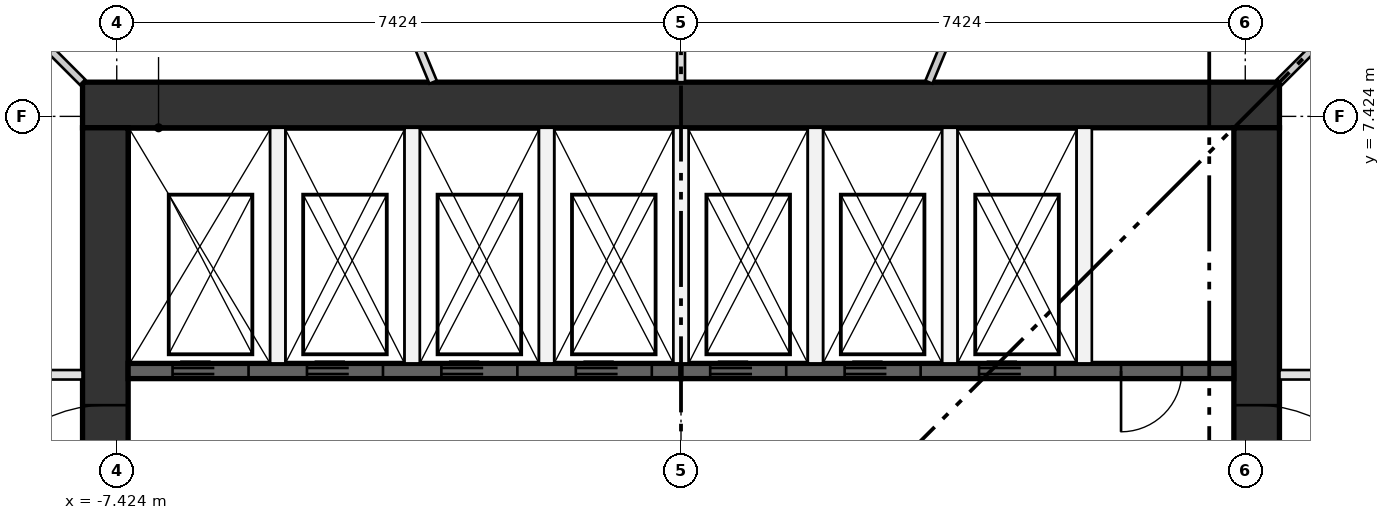
"""IFC4 building model, lengths in metres.
Left out: names, types, materials, properties, quantities, classifications, styles, units other than length and angle.
Written with IfcOpenShell. Run it as: python <this file> out.ifc"""

import sys

from ifc_helpers import new_model, si_unit, direction, frame, frame_2d, origin, place, context, subcontext, project, spatial, rectangle, extrude, element, fill, save


model = new_model("IFC4")
c1 = context("Model", 3, precision=1e-05, world=origin(), true_north=direction((0.0, 1.0)))
c2 = subcontext(c1, "Body", "Model", "MODEL_VIEW")
j1 = project(units=[si_unit("LENGTHUNIT", "METRE"), si_unit("PLANEANGLEUNIT", "RADIAN")], contexts=[c1])
p1 = place(None, origin())
s1 = spatial("IfcSite", under=j1, at=p1, CompositionType="ELEMENT")
p2 = place(p1, origin())
s2 = spatial("IfcBuilding", under=s1, at=p2, CompositionType="ELEMENT")
p3 = place(p2, frame((0.0, 0.0, 151.1)))
s3 = spatial("IfcBuildingStorey", under=s2, at=p3, CompositionType="ELEMENT", Elevation=151.1)
p4 = place(p3, frame((-7.874, 7.574, 0.0), z_axis=(0.0, 0.0, 1.0), x_axis=(1.0, 0.0, 0.0)))
e1 = element("IfcWall", 1, at=p4, inside=s3, PredefinedType="SHEAR", context=c2, shape_type="SweptSolid", body=[
    extrude(rectangle(XDim=15.748, YDim=0.6, at=frame_2d((7.874, 0.0))), origin(), (0.0, 0.0, 1.0), 3.35),
])
p5 = place(p3, frame((-7.574, -7.274, 0.0), z_axis=(0.0, 0.0, 1.0), x_axis=(0.0, 1.0, 0.0)))
e2 = element("IfcWall", 2, at=p5, inside=s3, PredefinedType="SHEAR", context=c2, shape_type="SweptSolid", body=[
    extrude(rectangle(XDim=14.548, YDim=0.6, at=frame_2d((7.274, 0.0))), origin(), (0.0, 0.0, 1.0), 3.35),
])
p6 = place(p5, frame((6.774, 0.0, 0.0)))
e3 = element("IfcOpeningElement", 3, at=p6, cuts=e2, PredefinedType="OPENING", context=c2, shape_type="SweptSolid", body=[
    extrude(rectangle(XDim=1.0, YDim=2.1, at=frame_2d((0.5, 1.05))), frame((0.0, 0.31, 0.0), z_axis=(0.0, -1.0, 0.0), x_axis=(1.0, 0.0, 0.0)), (0.0, 0.0, 1.0), 0.62),
])
p7 = place(p5, frame((3.649, 0.0, 0.0)))
e4 = element("IfcOpeningElement", 4, at=p7, cuts=e2, PredefinedType="OPENING", context=c2, shape_type="SweptSolid", body=[
    extrude(rectangle(XDim=1.8, YDim=2.1, at=frame_2d((0.9, 1.05))), frame((0.0, 0.31, 0.0), z_axis=(0.0, -1.0, 0.0), x_axis=(1.0, 0.0, 0.0)), (0.0, 0.0, 1.0), 0.62),
])
p8 = place(p5, frame((9.098, 0.0, 0.0)))
e5 = element("IfcOpeningElement", 5, at=p8, cuts=e2, PredefinedType="OPENING", context=c2, shape_type="SweptSolid", body=[
    extrude(rectangle(XDim=1.8, YDim=2.1, at=frame_2d((0.9, 1.05))), frame((0.0, 0.31, 0.0), z_axis=(0.0, -1.0, 0.0), x_axis=(1.0, 0.0, 0.0)), (0.0, 0.0, 1.0), 0.62),
])
p9 = place(p3, frame((7.574, -7.274, 0.0), z_axis=(0.0, 0.0, 1.0), x_axis=(0.0, 1.0, 0.0)))
e6 = element("IfcWall", 6, at=p9, inside=s3, PredefinedType="SHEAR", context=c2, shape_type="SweptSolid", body=[
    extrude(rectangle(XDim=14.548, YDim=0.6, at=frame_2d((7.274, 0.0))), origin(), (0.0, 0.0, 1.0), 3.35),
])
p10 = place(p9, frame((6.774, 0.0, 0.0)))
e7 = element("IfcOpeningElement", 7, at=p10, cuts=e6, PredefinedType="OPENING", context=c2, shape_type="SweptSolid", body=[
    extrude(rectangle(XDim=1.0, YDim=2.1, at=frame_2d((0.5, 1.05))), frame((0.0, 0.31, 0.0), z_axis=(0.0, -1.0, 0.0), x_axis=(1.0, 0.0, 0.0)), (0.0, 0.0, 1.0), 0.62),
])
p11 = place(p9, frame((3.649, 0.0, 0.0)))
e8 = element("IfcOpeningElement", 8, at=p11, cuts=e6, PredefinedType="OPENING", context=c2, shape_type="SweptSolid", body=[
    extrude(rectangle(XDim=1.8, YDim=2.1, at=frame_2d((0.9, 1.05))), frame((0.0, 0.31, 0.0), z_axis=(0.0, -1.0, 0.0), x_axis=(1.0, 0.0, 0.0)), (0.0, 0.0, 1.0), 0.62),
])
p12 = place(p9, frame((9.098, 0.0, 0.0)))
e9 = element("IfcOpeningElement", 9, at=p12, cuts=e6, PredefinedType="OPENING", context=c2, shape_type="SweptSolid", body=[
    extrude(rectangle(XDim=1.8, YDim=2.1, at=frame_2d((0.9, 1.05))), frame((0.0, 0.31, 0.0), z_axis=(0.0, -1.0, 0.0), x_axis=(1.0, 0.0, 0.0)), (0.0, 0.0, 1.0), 0.62),
])
p13 = place(p3, frame((-7.274, 4.074, 0.0), z_axis=(0.0, 0.0, 1.0), x_axis=(1.0, 0.0, 0.0)))
e10 = element("IfcWall", 10, at=p13, inside=s3, PredefinedType="SHEAR", context=c2, shape_type="SweptSolid", body=[
    extrude(rectangle(XDim=7.274, YDim=0.2, at=frame_2d((3.637, 0.0))), origin(), (0.0, 0.0, 1.0), 3.0),
])
p14 = place(p13, frame((0.584, 0.0, 0.0)))
e11 = element("IfcOpeningElement", 11, at=p14, cuts=e10, PredefinedType="OPENING", context=c2, shape_type="SweptSolid", body=[
    extrude(rectangle(XDim=1.0, YDim=2.1, at=frame_2d((0.5, 1.05))), frame((0.0, 0.11, 0.0), z_axis=(0.0, -1.0, 0.0), x_axis=(1.0, 0.0, 0.0)), (0.0, 0.0, 1.0), 0.22),
])
p15 = place(p13, frame((2.353, 0.0, 0.0)))
e12 = element("IfcOpeningElement", 12, at=p15, cuts=e10, PredefinedType="OPENING", context=c2, shape_type="SweptSolid", body=[
    extrude(rectangle(XDim=1.0, YDim=2.1, at=frame_2d((0.5, 1.05))), frame((0.0, 0.11, 0.0), z_axis=(0.0, -1.0, 0.0), x_axis=(1.0, 0.0, 0.0)), (0.0, 0.0, 1.0), 0.22),
])
p16 = place(p13, frame((4.121, 0.0, 0.0)))
e13 = element("IfcOpeningElement", 13, at=p16, cuts=e10, PredefinedType="OPENING", context=c2, shape_type="SweptSolid", body=[
    extrude(rectangle(XDim=1.0, YDim=2.1, at=frame_2d((0.5, 1.05))), frame((0.0, 0.11, 0.0), z_axis=(0.0, -1.0, 0.0), x_axis=(1.0, 0.0, 0.0)), (0.0, 0.0, 1.0), 0.22),
])
p17 = place(p13, frame((5.89, 0.0, 0.0)))
e14 = element("IfcOpeningElement", 14, at=p17, cuts=e10, PredefinedType="OPENING", context=c2, shape_type="SweptSolid", body=[
    extrude(rectangle(XDim=1.0, YDim=2.1, at=frame_2d((0.5, 1.05))), frame((0.0, 0.11, 0.0), z_axis=(0.0, -1.0, 0.0), x_axis=(1.0, 0.0, 0.0)), (0.0, 0.0, 1.0), 0.22),
])
p18 = place(p3, frame((0.0, 4.074, 0.0), z_axis=(0.0, 0.0, 1.0), x_axis=(1.0, 0.0, 0.0)))
e15 = element("IfcWall", 15, at=p18, inside=s3, PredefinedType="SHEAR", context=c2, shape_type="SweptSolid", body=[
    extrude(rectangle(XDim=7.274, YDim=0.2, at=frame_2d((3.637, 0.0))), origin(), (0.0, 0.0, 1.0), 3.0),
])
p19 = place(p18, frame((0.384, 0.0, 0.0)))
e16 = element("IfcOpeningElement", 16, at=p19, cuts=e15, PredefinedType="OPENING", context=c2, shape_type="SweptSolid", body=[
    extrude(rectangle(XDim=1.0, YDim=2.1, at=frame_2d((0.5, 1.05))), frame((0.0, 0.11, 0.0), z_axis=(0.0, -1.0, 0.0), x_axis=(1.0, 0.0, 0.0)), (0.0, 0.0, 1.0), 0.22),
])
p20 = place(p18, frame((2.153, 0.0, 0.0)))
e17 = element("IfcOpeningElement", 17, at=p20, cuts=e15, PredefinedType="OPENING", context=c2, shape_type="SweptSolid", body=[
    extrude(rectangle(XDim=1.0, YDim=2.1, at=frame_2d((0.5, 1.05))), frame((0.0, 0.11, 0.0), z_axis=(0.0, -1.0, 0.0), x_axis=(1.0, 0.0, 0.0)), (0.0, 0.0, 1.0), 0.22),
])
p21 = place(p18, frame((3.921, 0.0, 0.0)))
e18 = element("IfcOpeningElement", 18, at=p21, cuts=e15, PredefinedType="OPENING", context=c2, shape_type="SweptSolid", body=[
    extrude(rectangle(XDim=1.0, YDim=2.1, at=frame_2d((0.5, 1.05))), frame((0.0, 0.11, 0.0), z_axis=(0.0, -1.0, 0.0), x_axis=(1.0, 0.0, 0.0)), (0.0, 0.0, 1.0), 0.22),
])
p22 = place(p18, frame((5.79, 0.0, 0.0)))
e19 = element("IfcOpeningElement", 19, at=p22, cuts=e15, PredefinedType="OPENING", context=c2, shape_type="SweptSolid", body=[
    extrude(rectangle(XDim=0.8, YDim=2.1, at=frame_2d((0.4, 1.05))), frame((0.0, 0.11, 0.0), z_axis=(0.0, -1.0, 0.0), x_axis=(1.0, 0.0, 0.0)), (0.0, 0.0, 1.0), 0.22),
])
for number, where, z_axis, x_axis in (
    (20, (-5.305, 4.174, 0.0), (0.0, 0.0, 1.0), (0.0, 1.0, 0.0)),
    (21, (-3.537, 4.174, 0.0), (0.0, 0.0, 1.0), (0.0, 1.0, 0.0)),
    (22, (-1.769, 4.174, 0.0), (0.0, 0.0, 1.0), (0.0, 1.0, 0.0)),
    (23, (0.0, 4.174, 0.0), (0.0, 0.0, 1.0), (0.0, 1.0, 0.0)),
    (24, (1.769, 4.174, 0.0), (0.0, 0.0, 1.0), (0.0, 1.0, 0.0)),
    (25, (3.537, 4.174, 0.0), (0.0, 0.0, 1.0), (0.0, 1.0, 0.0)),
    (26, (5.305, 4.174, 0.0), (0.0, 0.0, 1.0), (0.0, 1.0, 0.0)),
):
    element("IfcWall", number, at=place(p3, frame(where, z_axis=z_axis, x_axis=x_axis)), inside=s3, PredefinedType="PARTITIONING", context=c2, shape_type="SweptSolid", body=[
        extrude(rectangle(XDim=3.1, YDim=0.2, at=frame_2d((1.55, 0.0))), origin(), (0.0, 0.0, 1.0), 3.0),
    ])
p23 = place(p3, frame((7.874, 4.024, 0.0), z_axis=(0.0, 0.0, 1.0), x_axis=(1.0, 0.0, 0.0)))
e27 = element("IfcWall", 27, at=p23, inside=s3, PredefinedType="PARTITIONING", context=c2, shape_type="SweptSolid", body=[
    extrude(rectangle(XDim=5.036, YDim=0.125, at=frame_2d((2.518, 0.0))), origin(), (0.0, 0.0, 1.0), 3.0),
])
p24 = place(p23, frame((2.0, 0.0, 0.0)))
e28 = element("IfcOpeningElement", 28, at=p24, cuts=e27, PredefinedType="OPENING", context=c2, shape_type="SweptSolid", body=[
    extrude(rectangle(XDim=1.0, YDim=2.1, at=frame_2d((0.5, 1.05))), frame((0.0, 0.073, 0.0), z_axis=(0.0, -1.0, 0.0), x_axis=(1.0, 0.0, 0.0)), (0.0, 0.0, 1.0), 0.145),
])
p25 = place(p3, frame((-11.645, 4.024, 0.0), z_axis=(0.0, 0.0, 1.0), x_axis=(1.0, 0.0, 0.0)))
e29 = element("IfcWall", 29, at=p25, inside=s3, PredefinedType="PARTITIONING", context=c2, shape_type="SweptSolid", body=[
    extrude(rectangle(XDim=3.771, YDim=0.125, at=frame_2d((1.886, 0.0))), origin(), (0.0, 0.0, 1.0), 3.0),
])
p26 = place(p25, frame((1.4, 0.0, 0.0)))
e30 = element("IfcOpeningElement", 30, at=p26, cuts=e29, PredefinedType="OPENING", context=c2, shape_type="SweptSolid", body=[
    extrude(rectangle(XDim=1.0, YDim=2.1, at=frame_2d((0.5, 1.05))), frame((0.0, 0.073, 0.0), z_axis=(0.0, -1.0, 0.0), x_axis=(1.0, 0.0, 0.0)), (0.0, 0.0, 1.0), 0.145),
])
p27 = place(p3, frame((7.874, 7.874, 0.0), z_axis=(0.0, 0.0, 1.0), x_axis=(0.707106781187, 0.707106781187, 0.0)))
e31 = element("IfcWall", 31, at=p27, inside=s3, PredefinedType="PARTITIONING", context=c2, shape_type="SweptSolid", body=[
    extrude(rectangle(XDim=6.564, YDim=0.1, at=frame_2d((3.282, 0.0))), origin(), (0.0, 0.0, 1.0), 3.0),
])
p28 = place(p27, frame((2.5, 0.0, 0.0)))
e32 = element("IfcOpeningElement", 32, at=p28, cuts=e31, PredefinedType="OPENING", context=c2, shape_type="SweptSolid", body=[
    extrude(rectangle(XDim=1.0, YDim=2.1, at=frame_2d((0.5, 1.05))), frame((0.0, 0.06, 0.0), z_axis=(0.0, -1.0, 0.0), x_axis=(1.0, 0.0, 0.0)), (0.0, 0.0, 1.0), 0.12),
])
p29 = place(p3, frame((3.261, 7.874, 0.0), z_axis=(0.0, 0.0, 1.0), x_axis=(0.382691869474, 0.923876037701, 0.0)))
e33 = element("IfcWall", 33, at=p29, inside=s3, PredefinedType="PARTITIONING", context=c2, shape_type="SweptSolid", body=[
    extrude(rectangle(XDim=4.607, YDim=0.1, at=frame_2d((2.304, 0.0))), origin(), (0.0, 0.0, 1.0), 3.0),
])
p30 = place(p29, frame((1.8, 0.0, 0.0)))
e34 = element("IfcOpeningElement", 34, at=p30, cuts=e33, PredefinedType="OPENING", context=c2, shape_type="SweptSolid", body=[
    extrude(rectangle(XDim=1.0, YDim=2.1, at=frame_2d((0.5, 1.05))), frame((0.0, 0.06, 0.0), z_axis=(0.0, -1.0, 0.0), x_axis=(1.0, 0.0, 0.0)), (0.0, 0.0, 1.0), 0.12),
])
p31 = place(p3, frame((0.0, 7.874, 0.0), z_axis=(0.0, 0.0, 1.0), x_axis=(0.0, 1.0, 0.0)))
e35 = element("IfcWall", 35, at=p31, inside=s3, PredefinedType="PARTITIONING", context=c2, shape_type="SweptSolid", body=[
    extrude(rectangle(XDim=5.256, YDim=0.105, at=frame_2d((2.628, 0.0))), origin(), (0.0, 0.0, 1.0), 3.0),
])
p32 = place(p31, frame((2.1, 0.0, 0.0)))
e36 = element("IfcOpeningElement", 36, at=p32, cuts=e35, PredefinedType="OPENING", context=c2, shape_type="SweptSolid", body=[
    extrude(rectangle(XDim=1.0, YDim=2.1, at=frame_2d((0.5, 1.05))), frame((0.0, 0.062, 0.0), z_axis=(0.0, -1.0, 0.0), x_axis=(1.0, 0.0, 0.0)), (0.0, 0.0, 1.0), 0.125),
])
p33 = place(p3, frame((-3.261, 7.874, 0.0), z_axis=(0.0, 0.0, 1.0), x_axis=(-0.382691869474, 0.923876037701, 0.0)))
e37 = element("IfcWall", 37, at=p33, inside=s3, PredefinedType="PARTITIONING", context=c2, shape_type="SweptSolid", body=[
    extrude(rectangle(XDim=4.607, YDim=0.105, at=frame_2d((2.304, 0.0))), origin(), (0.0, 0.0, 1.0), 3.0),
])
p34 = place(p3, frame((-12.516, 12.516, 0.0), z_axis=(0.0, 0.0, 1.0), x_axis=(0.707106781187, -0.707106781187, 0.0)))
e38 = element("IfcWall", 38, at=p34, inside=s3, PredefinedType="PARTITIONING", context=c2, shape_type="SweptSolid", body=[
    extrude(rectangle(XDim=6.564, YDim=0.1, at=frame_2d((3.282, 0.0))), origin(), (0.0, 0.0, 1.0), 3.0),
])
p35 = place(p34, frame((3.0, 0.0, 0.0)))
e39 = element("IfcOpeningElement", 39, at=p35, cuts=e38, PredefinedType="OPENING", context=c2, shape_type="SweptSolid", body=[
    extrude(rectangle(XDim=1.0, YDim=2.1, at=frame_2d((0.5, 1.05))), frame((0.0, 0.06, 0.0), z_axis=(0.0, -1.0, 0.0), x_axis=(1.0, 0.0, 0.0)), (0.0, 0.0, 1.0), 0.12),
])
p36 = place(p14, frame((1.0, 0.0, 0.0), z_axis=(0.0, 0.0, 1.0), x_axis=(-1.0, 0.0, 0.0)))
e40 = element("IfcDoor", 40, at=p36, inside=s3, OperationType="DOUBLE_DOOR_SLIDING", PredefinedType="DOOR", context=c2, shape_type="SweptSolid", body=[
    extrude(rectangle(XDim=1.0, YDim=2.1, at=frame_2d((0.5, 1.05))), frame((0.0, 0.025, 0.0), z_axis=(0.0, -1.0, 0.0), x_axis=(1.0, 0.0, 0.0)), (0.0, 0.0, 1.0), 0.05),
])
fill(e11, e40)
p37 = place(p15, frame((1.0, 0.0, 0.0), z_axis=(0.0, 0.0, 1.0), x_axis=(-1.0, 0.0, 0.0)))
e41 = element("IfcDoor", 41, at=p37, inside=s3, OperationType="DOUBLE_DOOR_SLIDING", PredefinedType="DOOR", context=c2, shape_type="SweptSolid", body=[
    extrude(rectangle(XDim=1.0, YDim=2.1, at=frame_2d((0.5, 1.05))), frame((0.0, 0.025, 0.0), z_axis=(0.0, -1.0, 0.0), x_axis=(1.0, 0.0, 0.0)), (0.0, 0.0, 1.0), 0.05),
])
fill(e12, e41)
p38 = place(p16, frame((1.0, 0.0, 0.0), z_axis=(0.0, 0.0, 1.0), x_axis=(-1.0, 0.0, 0.0)))
e42 = element("IfcDoor", 42, at=p38, inside=s3, OperationType="DOUBLE_DOOR_SLIDING", PredefinedType="DOOR", context=c2, shape_type="SweptSolid", body=[
    extrude(rectangle(XDim=1.0, YDim=2.1, at=frame_2d((0.5, 1.05))), frame((0.0, 0.025, 0.0), z_axis=(0.0, -1.0, 0.0), x_axis=(1.0, 0.0, 0.0)), (0.0, 0.0, 1.0), 0.05),
])
fill(e13, e42)
p39 = place(p17, frame((1.0, 0.0, 0.0), z_axis=(0.0, 0.0, 1.0), x_axis=(-1.0, 0.0, 0.0)))
e43 = element("IfcDoor", 43, at=p39, inside=s3, OperationType="DOUBLE_DOOR_SLIDING", PredefinedType="DOOR", context=c2, shape_type="SweptSolid", body=[
    extrude(rectangle(XDim=1.0, YDim=2.1, at=frame_2d((0.5, 1.05))), frame((0.0, 0.025, 0.0), z_axis=(0.0, -1.0, 0.0), x_axis=(1.0, 0.0, 0.0)), (0.0, 0.0, 1.0), 0.05),
])
fill(e14, e43)
p40 = place(p19, frame((1.0, 0.0, 0.0), z_axis=(0.0, 0.0, 1.0), x_axis=(-1.0, 0.0, 0.0)))
e44 = element("IfcDoor", 44, at=p40, inside=s3, OperationType="DOUBLE_DOOR_SLIDING", PredefinedType="DOOR", context=c2, shape_type="SweptSolid", body=[
    extrude(rectangle(XDim=1.0, YDim=2.1, at=frame_2d((0.5, 1.05))), frame((0.0, 0.025, 0.0), z_axis=(0.0, -1.0, 0.0), x_axis=(1.0, 0.0, 0.0)), (0.0, 0.0, 1.0), 0.05),
])
fill(e16, e44)
p41 = place(p20, frame((1.0, 0.0, 0.0), z_axis=(0.0, 0.0, 1.0), x_axis=(-1.0, 0.0, 0.0)))
e45 = element("IfcDoor", 45, at=p41, inside=s3, OperationType="DOUBLE_DOOR_SLIDING", PredefinedType="DOOR", context=c2, shape_type="SweptSolid", body=[
    extrude(rectangle(XDim=1.0, YDim=2.1, at=frame_2d((0.5, 1.05))), frame((0.0, 0.025, 0.0), z_axis=(0.0, -1.0, 0.0), x_axis=(1.0, 0.0, 0.0)), (0.0, 0.0, 1.0), 0.05),
])
fill(e17, e45)
p42 = place(p21, frame((1.0, 0.0, 0.0), z_axis=(0.0, 0.0, 1.0), x_axis=(-1.0, 0.0, 0.0)))
e46 = element("IfcDoor", 46, at=p42, inside=s3, OperationType="DOUBLE_DOOR_SLIDING", PredefinedType="DOOR", context=c2, shape_type="SweptSolid", body=[
    extrude(rectangle(XDim=1.0, YDim=2.1, at=frame_2d((0.5, 1.05))), frame((0.0, 0.025, 0.0), z_axis=(0.0, -1.0, 0.0), x_axis=(1.0, 0.0, 0.0)), (0.0, 0.0, 1.0), 0.05),
])
fill(e18, e46)
p43 = place(p22, frame((0.8, 0.0, 0.0), z_axis=(0.0, 0.0, 1.0), x_axis=(-1.0, 0.0, 0.0)))
e47 = element("IfcDoor", 47, at=p43, inside=s3, OperationType="SINGLE_SWING_LEFT", PredefinedType="DOOR", context=c2, shape_type="SweptSolid", body=[
    extrude(rectangle(XDim=0.8, YDim=2.1, at=frame_2d((0.4, 1.05))), frame((0.0, 0.025, 0.0), z_axis=(0.0, -1.0, 0.0), x_axis=(1.0, 0.0, 0.0)), (0.0, 0.0, 1.0), 0.05),
])
fill(e19, e47)
p44 = place(p8, origin())
e48 = element("IfcDoor", 48, at=p44, inside=s3, OperationType="DOUBLE_DOOR_SINGLE_SWING", PredefinedType="DOOR", context=c2, shape_type="SweptSolid", body=[
    extrude(rectangle(XDim=1.8, YDim=2.1, at=frame_2d((0.9, 1.05))), frame((0.0, 0.025, 0.0), z_axis=(0.0, -1.0, 0.0), x_axis=(1.0, 0.0, 0.0)), (0.0, 0.0, 1.0), 0.05),
])
fill(e5, e48)
p45 = place(p12, frame((1.8, 0.0, 0.0), z_axis=(0.0, 0.0, 1.0), x_axis=(-1.0, 0.0, 0.0)))
e49 = element("IfcDoor", 49, at=p45, inside=s3, OperationType="DOUBLE_DOOR_SINGLE_SWING", PredefinedType="DOOR", context=c2, shape_type="SweptSolid", body=[
    extrude(rectangle(XDim=1.8, YDim=2.1, at=frame_2d((0.9, 1.05))), frame((0.0, 0.025, 0.0), z_axis=(0.0, -1.0, 0.0), x_axis=(1.0, 0.0, 0.0)), (0.0, 0.0, 1.0), 0.05),
])
fill(e9, e49)
save(model, sys.argv[1])
